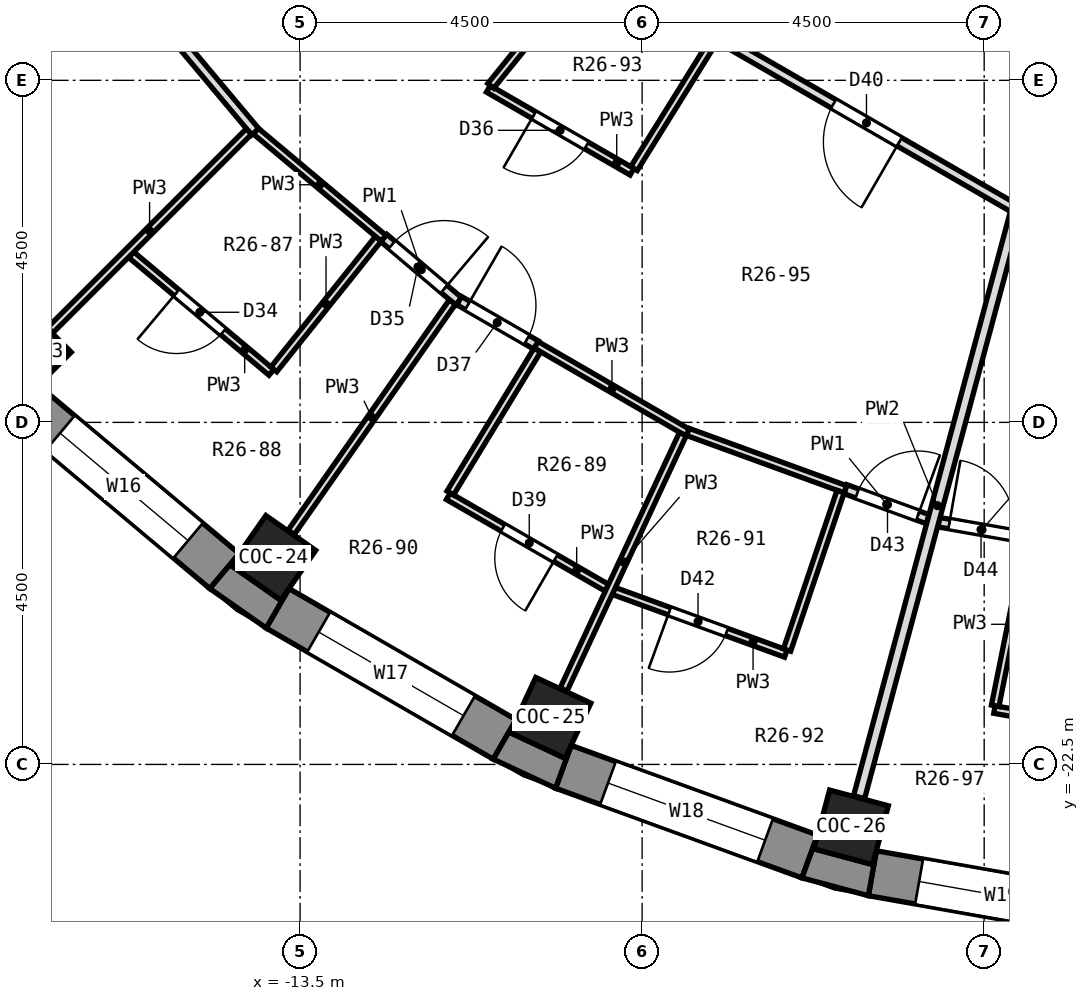
"""IFC4 building model, lengths in metres.
Left out: names, types, materials, properties, quantities, classifications, styles, units other than length and angle.
Written with IfcOpenShell. Run it as: python <this file> out.ifc"""

import sys

from ifc_helpers import new_model, si_unit, direction, frame, frame_2d, origin, origin_2d, place, context, subcontext, project, spatial, polyline, rectangle, outline, extrude, element, fill, save


model = new_model("IFC4")
c1 = context("Model", 3, precision=1e-05, world=origin(), true_north=direction((0.0, 1.0)))
c2 = subcontext(c1, "Body", "Model", "MODEL_VIEW")
j1 = project(units=[si_unit("LENGTHUNIT", "METRE"), si_unit("PLANEANGLEUNIT", "RADIAN")], contexts=[c1])
p1 = place(None, origin())
s1 = spatial("IfcSite", under=j1, at=p1, CompositionType="ELEMENT")
p2 = place(p1, origin())
s2 = spatial("IfcBuilding", under=s1, at=p2, CompositionType="ELEMENT")
p3 = place(p2, frame((0.0, 0.0, 170.7)))
s3 = spatial("IfcBuildingStorey", under=s2, at=p3, CompositionType="ELEMENT", Elevation=170.7)
for number, where, z_axis, x_axis in (
    (1, (-17.077, -17.077, 0.0), (0.0, 0.0, 1.0), (-0.707, -0.707, 0.0)),
    (2, (-13.852, -19.782, 0.0), (0.0, 0.0, 1.0), (-0.574, -0.819, 0.0)),
    (3, (-10.206, -21.887, 0.0), (0.0, 0.0, 1.0), (-0.423, -0.906, 0.0)),
    (4, (-6.25, -23.327, 0.0), (0.0, 0.0, 1.0), (-0.259, -0.966, 0.0)),
):
    element("IfcColumn", number, at=place(p3, frame(where, z_axis=z_axis, x_axis=x_axis)), inside=s3, PredefinedType="COLUMN", context=c2, shape_type="SweptSolid", body=[
        extrude(rectangle(XDim=0.8, YDim=0.8, at=origin_2d()), origin(), (0.0, 0.0, 1.0), 3.3),
    ])
p4 = place(p3, frame((-17.137, -17.74, 0.0), z_axis=(0.0, 0.0, 1.0), x_axis=(0.766058884809, -0.642770398358, 0.0)))
e5 = element("IfcWall", 5, at=p4, inside=s3, PredefinedType="SOLIDWALL", context=c2, shape_type="SweptSolid", body=[
    extrude(rectangle(XDim=3.449, YDim=0.6, at=frame_2d((1.725, 0.0))), origin(), (0.0, 0.0, 1.0), 2.85),
])
p5 = place(p4, frame((0.625, 0.0, 0.9)))
e6 = element("IfcOpeningElement", 6, at=p5, cuts=e5, PredefinedType="OPENING", context=c2, shape_type="SweptSolid", body=[
    extrude(rectangle(XDim=2.2, YDim=1.8, at=frame_2d((1.1, 0.9))), frame((0.0, 0.312, 0.0), z_axis=(0.0, -1.0, 0.0), x_axis=(1.0, 0.0, 0.0)), (0.0, 0.0, 1.0), 0.624),
])
p6 = place(p3, frame((-13.796, -20.446, 0.0), z_axis=(0.0, 0.0, 1.0), x_axis=(0.86602648383, -0.499998129301, 0.0)))
e7 = element("IfcWall", 7, at=p6, inside=s3, PredefinedType="SOLIDWALL", context=c2, shape_type="SweptSolid", body=[
    extrude(rectangle(XDim=3.45, YDim=0.6, at=frame_2d((1.725, 0.0))), origin(), (0.0, 0.0, 1.0), 2.85),
])
p7 = place(p6, frame((0.625, 0.0, 0.9)))
e8 = element("IfcOpeningElement", 8, at=p7, cuts=e7, PredefinedType="OPENING", context=c2, shape_type="SweptSolid", body=[
    extrude(rectangle(XDim=2.2, YDim=1.8, at=frame_2d((1.1, 0.9))), frame((0.0, 0.312, 0.0), z_axis=(0.0, -1.0, 0.0), x_axis=(1.0, 0.0, 0.0)), (0.0, 0.0, 1.0), 0.624),
])
p8 = place(p3, frame((-10.036, -22.531, 0.0), z_axis=(0.0, 0.0, 1.0), x_axis=(0.93968799822, -0.342032843455, 0.0)))
e9 = element("IfcWall", 9, at=p8, inside=s3, PredefinedType="SOLIDWALL", context=c2, shape_type="SweptSolid", body=[
    extrude(rectangle(XDim=3.45, YDim=0.6, at=frame_2d((1.725, 0.0))), origin(), (0.0, 0.0, 1.0), 2.85),
])
p9 = place(p8, frame((0.625, 0.0, 0.9)))
e10 = element("IfcOpeningElement", 10, at=p9, cuts=e9, PredefinedType="OPENING", context=c2, shape_type="SweptSolid", body=[
    extrude(rectangle(XDim=2.2, YDim=1.8, at=frame_2d((1.1, 0.9))), frame((0.0, 0.312, 0.0), z_axis=(0.0, -1.0, 0.0), x_axis=(1.0, 0.0, 0.0)), (0.0, 0.0, 1.0), 0.624),
])
p10 = place(p3, frame((-5.971, -23.932, 0.0), z_axis=(0.0, 0.0, 1.0), x_axis=(0.984814892183, -0.173607684551, 0.0)))
e11 = element("IfcWall", 11, at=p10, inside=s3, PredefinedType="SOLIDWALL", context=c2, shape_type="SweptSolid", body=[
    extrude(rectangle(XDim=3.45, YDim=0.6, at=frame_2d((1.725, 0.0))), origin(), (0.0, 0.0, 1.0), 2.85),
])
p11 = place(p10, frame((0.625, 0.0, 0.9)))
e12 = element("IfcOpeningElement", 12, at=p11, cuts=e11, PredefinedType="OPENING", context=c2, shape_type="SweptSolid", body=[
    extrude(rectangle(XDim=2.2, YDim=1.8, at=frame_2d((1.1, 0.9))), frame((0.0, 0.312, 0.0), z_axis=(0.0, -1.0, 0.0), x_axis=(1.0, 0.0, 0.0)), (0.0, 0.0, 1.0), 0.624),
])
p12 = place(p3, origin())
e13 = element("IfcWall", 13, at=p12, inside=s3, PredefinedType="SOLIDWALL", context=c2, shape_type="SweptSolid", body=[
    extrude(outline(polyline([(-14.687, -20.187), (-13.946, -20.706), (-13.646, -20.186), (-13.754, -20.34), (-14.409, -19.881), (-14.302, -19.727), (-14.687, -20.187)])), origin(), (0.0, 0.0, 1.0), 2.85),
])
p13 = place(p3, origin())
e14 = element("IfcWall", 14, at=p13, inside=s3, PredefinedType="SOLIDWALL", context=c2, shape_type="SweptSolid", body=[
    extrude(outline(polyline([(-10.139, -22.813), (-9.934, -22.249), (-10.013, -22.419), (-10.738, -22.081), (-10.659, -21.911), (-10.959, -22.431), (-10.139, -22.813)])), origin(), (0.0, 0.0, 1.0), 2.85),
])
p14 = place(p3, origin())
e15 = element("IfcWall", 15, at=p14, inside=s3, PredefinedType="SOLIDWALL", context=c2, shape_type="SweptSolid", body=[
    extrude(outline(polyline([(-6.023, -24.227), (-5.919, -23.636), (-5.968, -23.817), (-6.74, -23.61), (-6.692, -23.429), (-6.897, -23.993), (-6.023, -24.227)])), origin(), (0.0, 0.0, 1.0), 2.85),
])
p15 = place(p3, frame((-16.325, -11.511, 0.0), z_axis=(0.0, 0.0, 1.0), x_axis=(0.642416987395, -0.766355279428, 0.0)))
e16 = element("IfcWall", 16, at=p15, inside=s3, PredefinedType="PARTITIONING", context=c2, shape_type="SweptSolid", body=[
    extrude(rectangle(XDim=3.481, YDim=0.125, at=frame_2d((1.74, 0.0))), origin(), (0.0, 0.0, 1.0), 2.85),
])
p16 = place(p3, frame((-12.398, -15.574, 0.0), z_axis=(0.0, 0.0, 1.0), x_axis=(0.763379112729, -0.645950718128, 0.0)))
e17 = element("IfcWall", 17, at=p16, inside=s3, PredefinedType="PARTITIONING", context=c2, shape_type="SweptSolid", body=[
    extrude(rectangle(XDim=1.291, YDim=0.125, at=frame_2d((0.646, 0.0))), origin(), (0.0, 0.0, 1.0), 2.85),
])
p17 = place(p16, frame((0.139, 0.0, 0.0)))
e18 = element("IfcOpeningElement", 18, at=p17, cuts=e17, PredefinedType="OPENING", context=c2, shape_type="SweptSolid", body=[
    extrude(rectangle(XDim=0.9, YDim=2.1, at=frame_2d((0.45, 1.05))), frame((0.0, 0.074, 0.0), z_axis=(0.0, -1.0, 0.0), x_axis=(1.0, 0.0, 0.0)), (0.0, 0.0, 1.0), 0.149),
])
p18 = place(p3, frame((-15.723, -15.793, 0.0), z_axis=(0.0, 0.0, 1.0), x_axis=(0.766024146731, -0.642811797204, 0.0)))
e19 = element("IfcWall", 19, at=p18, inside=s3, PredefinedType="PARTITIONING", context=c2, shape_type="SweptSolid", body=[
    extrude(rectangle(XDim=2.409, YDim=0.1, at=frame_2d((1.205, 0.0))), origin(), (0.0, 0.0, 1.0), 2.85),
])
p19 = place(p18, frame((0.78, 0.0, 0.0)))
e20 = element("IfcOpeningElement", 20, at=p19, cuts=e19, PredefinedType="OPENING", context=c2, shape_type="SweptSolid", body=[
    extrude(rectangle(XDim=0.8, YDim=2.1, at=frame_2d((0.4, 1.05))), frame((0.0, 0.062, 0.0), z_axis=(0.0, -1.0, 0.0), x_axis=(1.0, 0.0, 0.0)), (0.0, 0.0, 1.0), 0.124),
])
p20 = place(p3, frame((-14.081, -14.169, 0.0), z_axis=(0.0, 0.0, 1.0), x_axis=(0.766108401036, -0.642711379907, 0.0)))
e21 = element("IfcWall", 21, at=p20, inside=s3, PredefinedType="PARTITIONING", context=c2, shape_type="SweptSolid", body=[
    extrude(rectangle(XDim=2.192, YDim=0.1, at=frame_2d((1.096, 0.0))), origin(), (0.0, 0.0, 1.0), 2.85),
])
p21 = place(p3, frame((-10.395, -16.979, 0.0), z_axis=(0.0, 0.0, 1.0), x_axis=(0.86526186487, -0.501320162373, 0.0)))
e22 = element("IfcWall", 22, at=p21, inside=s3, PredefinedType="PARTITIONING", context=c2, shape_type="SweptSolid", body=[
    extrude(rectangle(XDim=2.305, YDim=0.1, at=frame_2d((1.152, 0.0))), origin(), (0.0, 0.0, 1.0), 2.85),
])
p22 = place(p3, frame((-11.55, -18.972, 0.0), z_axis=(0.0, 0.0, 1.0), x_axis=(0.866140030745, -0.499801407703, 0.0)))
e23 = element("IfcWall", 23, at=p22, inside=s3, PredefinedType="PARTITIONING", context=c2, shape_type="SweptSolid", body=[
    extrude(rectangle(XDim=2.409, YDim=0.1, at=frame_2d((1.205, 0.0))), origin(), (0.0, 0.0, 1.0), 2.85),
])
p23 = place(p22, frame((0.83, 0.0, 0.0)))
e24 = element("IfcOpeningElement", 24, at=p23, cuts=e23, PredefinedType="OPENING", context=c2, shape_type="SweptSolid", body=[
    extrude(rectangle(XDim=0.8, YDim=2.1, at=frame_2d((0.4, 1.05))), frame((0.0, 0.062, 0.0), z_axis=(0.0, -1.0, 0.0), x_axis=(1.0, 0.0, 0.0)), (0.0, 0.0, 1.0), 0.124),
])
p24 = place(p3, frame((-11.407, -16.398, 0.0), z_axis=(0.0, 0.0, 1.0), x_axis=(0.865955664968, -0.500120771724, 0.0)))
e25 = element("IfcWall", 25, at=p24, inside=s3, PredefinedType="PARTITIONING", context=c2, shape_type="SweptSolid", body=[
    extrude(rectangle(XDim=1.167, YDim=0.125, at=frame_2d((0.583, 0.0))), origin(), (0.0, 0.0, 1.0), 2.85),
])
p25 = place(p24, frame((0.127, 0.0, 0.0)))
e26 = element("IfcOpeningElement", 26, at=p25, cuts=e25, PredefinedType="OPENING", context=c2, shape_type="SweptSolid", body=[
    extrude(rectangle(XDim=0.9, YDim=2.1, at=frame_2d((0.45, 1.05))), frame((0.0, 0.074, 0.0), z_axis=(0.0, -1.0, 0.0), x_axis=(1.0, 0.0, 0.0)), (0.0, 0.0, 1.0), 0.149),
])
p26 = place(p3, frame((-11.023, -13.612, 0.0), z_axis=(0.0, 0.0, 1.0), x_axis=(0.86608684879, -0.499893559023, 0.0)))
e27 = element("IfcWall", 27, at=p26, inside=s3, PredefinedType="PARTITIONING", context=c2, shape_type="SweptSolid", body=[
    extrude(rectangle(XDim=2.182, YDim=0.1, at=frame_2d((1.091, 0.0))), origin(), (0.0, 0.0, 1.0), 2.85),
])
p27 = place(p26, frame((0.691, 0.0, 0.0)))
e28 = element("IfcOpeningElement", 28, at=p27, cuts=e27, PredefinedType="OPENING", context=c2, shape_type="SweptSolid", body=[
    extrude(rectangle(XDim=0.8, YDim=2.1, at=frame_2d((0.4, 1.05))), frame((0.0, 0.062, 0.0), z_axis=(0.0, -1.0, 0.0), x_axis=(1.0, 0.0, 0.0)), (0.0, 0.0, 1.0), 0.124),
])
p28 = place(p3, frame((-11.073, -11.158, 0.0), z_axis=(0.0, 0.0, 1.0), x_axis=(0.865999621737, -0.500044653157, 0.0)))
e29 = element("IfcWall", 29, at=p28, inside=s3, PredefinedType="PARTITIONING", context=c2, shape_type="SweptSolid", body=[
    extrude(rectangle(XDim=8.155, YDim=0.125, at=frame_2d((4.078, 0.0))), origin(), (0.0, 0.0, 1.0), 2.85),
])
p29 = place(p28, frame((5.302, 0.0, 0.0)))
e30 = element("IfcOpeningElement", 30, at=p29, cuts=e29, PredefinedType="OPENING", context=c2, shape_type="SweptSolid", body=[
    extrude(rectangle(XDim=1.0, YDim=2.1, at=frame_2d((0.5, 1.05))), frame((0.0, 0.074, 0.0), z_axis=(0.0, -1.0, 0.0), x_axis=(1.0, 0.0, 0.0)), (0.0, 0.0, 1.0), 0.149),
])
p30 = place(p3, frame((-6.325, -18.879, 0.0), z_axis=(0.0, 0.0, 1.0), x_axis=(0.93942221686, -0.342762160206, 0.0)))
e31 = element("IfcWall", 31, at=p30, inside=s3, PredefinedType="PARTITIONING", context=c2, shape_type="SweptSolid", body=[
    extrude(rectangle(XDim=1.154, YDim=0.125, at=frame_2d((0.577, 0.0))), origin(), (0.0, 0.0, 1.0), 2.85),
])
p31 = place(p30, frame((0.165, 0.0, 0.0)))
e32 = element("IfcOpeningElement", 32, at=p31, cuts=e31, PredefinedType="OPENING", context=c2, shape_type="SweptSolid", body=[
    extrude(rectangle(XDim=0.85, YDim=2.1, at=frame_2d((0.425, 1.05))), frame((0.0, 0.074, 0.0), z_axis=(0.0, -1.0, 0.0), x_axis=(1.0, 0.0, 0.0)), (0.0, 0.0, 1.0), 0.149),
])
p32 = place(p3, frame((-9.373, -20.218, 0.0), z_axis=(0.0, 0.0, 1.0), x_axis=(0.939707598657, -0.34197898916, 0.0)))
e33 = element("IfcWall", 33, at=p32, inside=s3, PredefinedType="PARTITIONING", context=c2, shape_type="SweptSolid", body=[
    extrude(rectangle(XDim=2.409, YDim=0.1, at=frame_2d((1.205, 0.0))), origin(), (0.0, 0.0, 1.0), 2.85),
])
p33 = place(p32, frame((0.78, 0.0, 0.0)))
e34 = element("IfcOpeningElement", 34, at=p33, cuts=e33, PredefinedType="OPENING", context=c2, shape_type="SweptSolid", body=[
    extrude(rectangle(XDim=0.8, YDim=2.1, at=frame_2d((0.4, 1.05))), frame((0.0, 0.062, 0.0), z_axis=(0.0, -1.0, 0.0), x_axis=(1.0, 0.0, 0.0)), (0.0, 0.0, 1.0), 0.124),
])
p34 = place(p3, frame((-8.397, -18.126, 0.0), z_axis=(0.0, 0.0, 1.0), x_axis=(0.939676937302, -0.342063230271, 0.0)))
e35 = element("IfcWall", 35, at=p34, inside=s3, PredefinedType="PARTITIONING", context=c2, shape_type="SweptSolid", body=[
    extrude(rectangle(XDim=2.204, YDim=0.1, at=frame_2d((1.102, 0.0))), origin(), (0.0, 0.0, 1.0), 2.85),
])
p35 = place(p3, frame((-4.365, -21.778, 0.0), z_axis=(0.0, 0.0, 1.0), x_axis=(0.984820260231, -0.173577230762, 0.0)))
e36 = element("IfcWall", 36, at=p35, inside=s3, PredefinedType="PARTITIONING", context=c2, shape_type="SweptSolid", body=[
    extrude(rectangle(XDim=2.409, YDim=0.1, at=frame_2d((1.205, 0.0))), origin(), (0.0, 0.0, 1.0), 2.85),
])
p36 = place(p35, frame((0.83, 0.0, 0.0)))
e37 = element("IfcOpeningElement", 37, at=p36, cuts=e36, PredefinedType="OPENING", context=c2, shape_type="SweptSolid", body=[
    extrude(rectangle(XDim=0.8, YDim=2.1, at=frame_2d((0.4, 1.05))), frame((0.0, 0.062, 0.0), z_axis=(0.0, -1.0, 0.0), x_axis=(1.0, 0.0, 0.0)), (0.0, 0.0, 1.0), 0.124),
])
p37 = place(p3, frame((-5.097, -19.313, 0.0), z_axis=(0.0, 0.0, 1.0), x_axis=(0.984787819846, -0.173761186352, 0.0)))
e38 = element("IfcWall", 38, at=p37, inside=s3, PredefinedType="PARTITIONING", context=c2, shape_type="SweptSolid", body=[
    extrude(rectangle(XDim=1.154, YDim=0.125, at=frame_2d((0.577, 0.0))), origin(), (0.0, 0.0, 1.0), 2.85),
])
p38 = place(p37, frame((0.139, 0.0, 0.0)))
e39 = element("IfcOpeningElement", 39, at=p38, cuts=e38, PredefinedType="OPENING", context=c2, shape_type="SweptSolid", body=[
    extrude(rectangle(XDim=0.85, YDim=2.1, at=frame_2d((0.425, 1.05))), frame((0.0, 0.074, 0.0), z_axis=(0.0, -1.0, 0.0), x_axis=(1.0, 0.0, 0.0)), (0.0, 0.0, 1.0), 0.149),
])
p39 = place(p3, frame((-16.787, -16.787, 0.0), z_axis=(0.0, 0.0, 1.0), x_axis=(0.707106781187, 0.707106781187, 0.0)))
e40 = element("IfcWall", 40, at=p39, inside=s3, PredefinedType="PARTITIONING", context=c2, shape_type="SweptSolid", body=[
    extrude(rectangle(XDim=3.696, YDim=0.1, at=frame_2d((1.848, 0.0))), origin(), (0.0, 0.0, 1.0), 2.85),
])
p40 = place(p3, frame((-10.991, -13.573, 0.0), z_axis=(0.0, 0.0, 1.0), x_axis=(0.629327284659, 0.777140379072, 0.0)))
e41 = element("IfcWall", 41, at=p40, inside=s3, PredefinedType="PARTITIONING", context=c2, shape_type="SweptSolid", body=[
    extrude(rectangle(XDim=2.013, YDim=0.1, at=frame_2d((1.007, 0.0))), origin(), (0.0, 0.0, 1.0), 2.85),
])
p41 = place(p3, frame((-13.846, -17.303, 0.0), z_axis=(0.0, 0.0, 1.0), x_axis=(0.624722111344, 0.780847157642, 0.0)))
e42 = element("IfcWall", 42, at=p41, inside=s3, PredefinedType="PARTITIONING", context=c2, shape_type="SweptSolid", body=[
    extrude(rectangle(XDim=2.2, YDim=0.1, at=frame_2d((1.1, 0.0))), origin(), (0.0, 0.0, 1.0), 2.85),
])
p42 = place(p3, frame((-13.617, -19.447, 0.0), z_axis=(0.0, 0.0, 1.0), x_axis=(0.573515531974, 0.819194686619, 0.0)))
e43 = element("IfcWall", 43, at=p42, inside=s3, PredefinedType="PARTITIONING", context=c2, shape_type="SweptSolid", body=[
    extrude(rectangle(XDim=3.697, YDim=0.1, at=frame_2d((1.848, 0.0))), origin(), (0.0, 0.0, 1.0), 2.85),
])
p43 = place(p3, frame((-9.107, -14.661, 0.0), z_axis=(0.0, 0.0, 1.0), x_axis=(0.528010719156, 0.849237705508, 0.0)))
e44 = element("IfcWall", 44, at=p43, inside=s3, PredefinedType="PARTITIONING", context=c2, shape_type="SweptSolid", body=[
    extrude(rectangle(XDim=1.988, YDim=0.1, at=frame_2d((0.994, 0.0))), origin(), (0.0, 0.0, 1.0), 2.85),
])
p44 = place(p3, frame((-11.524, -18.929, 0.0), z_axis=(0.0, 0.0, 1.0), x_axis=(0.520291802012, 0.853988548377, 0.0)))
e45 = element("IfcWall", 45, at=p44, inside=s3, PredefinedType="PARTITIONING", context=c2, shape_type="SweptSolid", body=[
    extrude(rectangle(XDim=2.201, YDim=0.1, at=frame_2d((1.1, 0.0))), origin(), (0.0, 0.0, 1.0), 2.85),
])
p45 = place(p3, frame((-10.034, -21.515, 0.0), z_axis=(0.0, 0.0, 1.0), x_axis=(0.423040405982, 0.906110818226, 0.0)))
e46 = element("IfcWall", 46, at=p45, inside=s3, PredefinedType="PARTITIONING", context=c2, shape_type="SweptSolid", body=[
    extrude(rectangle(XDim=3.709, YDim=0.1, at=frame_2d((1.854, 0.0))), origin(), (0.0, 0.0, 1.0), 2.85),
])
p46 = place(p3, frame((-7.093, -20.995, 0.0), z_axis=(0.0, 0.0, 1.0), x_axis=(0.320053851591, 0.947399351953, 0.0)))
e47 = element("IfcWall", 47, at=p46, inside=s3, PredefinedType="PARTITIONING", context=c2, shape_type="SweptSolid", body=[
    extrude(rectangle(XDim=2.2, YDim=0.1, at=frame_2d((1.1, 0.0))), origin(), (0.0, 0.0, 1.0), 2.85),
])
p47 = place(p3, frame((-6.146, -22.931, 0.0), z_axis=(0.0, 0.0, 1.0), x_axis=(0.259231390727, 0.965815244269, 0.0)))
e48 = element("IfcWall", 48, at=p47, inside=s3, PredefinedType="PARTITIONING", context=c2, shape_type="SweptSolid", body=[
    extrude(rectangle(XDim=7.941, YDim=0.15, at=frame_2d((3.971, 0.0))), origin(), (0.0, 0.0, 1.0), 2.85),
])
p48 = place(p3, frame((-4.355, -21.729, 0.0), z_axis=(0.0, 0.0, 1.0), x_axis=(0.196888353759, 0.980425915689, 0.0)))
e49 = element("IfcWall", 49, at=p48, inside=s3, PredefinedType="PARTITIONING", context=c2, shape_type="SweptSolid", body=[
    extrude(rectangle(XDim=2.188, YDim=0.1, at=frame_2d((1.094, 0.0))), origin(), (0.0, 0.0, 1.0), 2.85),
])
p49 = place(p5, origin())
e50 = element("IfcWindow", 50, at=p49, inside=s3, PartitioningType="SINGLE_PANEL", PredefinedType="WINDOW", context=c2, shape_type="SweptSolid", body=[
    extrude(rectangle(XDim=2.2, YDim=1.8, at=frame_2d((1.1, 0.9))), frame((0.0, 0.18, 0.0), z_axis=(0.0, -1.0, 0.0), x_axis=(1.0, 0.0, 0.0)), (0.0, 0.0, 1.0), 0.06),
])
fill(e6, e50)
p50 = place(p7, origin())
e51 = element("IfcWindow", 51, at=p50, inside=s3, PartitioningType="SINGLE_PANEL", PredefinedType="WINDOW", context=c2, shape_type="SweptSolid", body=[
    extrude(rectangle(XDim=2.2, YDim=1.8, at=frame_2d((1.1, 0.9))), frame((0.0, 0.18, 0.0), z_axis=(0.0, -1.0, 0.0), x_axis=(1.0, 0.0, 0.0)), (0.0, 0.0, 1.0), 0.06),
])
fill(e8, e51)
p51 = place(p9, origin())
e52 = element("IfcWindow", 52, at=p51, inside=s3, PartitioningType="SINGLE_PANEL", PredefinedType="WINDOW", context=c2, shape_type="SweptSolid", body=[
    extrude(rectangle(XDim=2.2, YDim=1.8, at=frame_2d((1.1, 0.9))), frame((0.0, 0.18, 0.0), z_axis=(0.0, -1.0, 0.0), x_axis=(1.0, 0.0, 0.0)), (0.0, 0.0, 1.0), 0.06),
])
fill(e10, e52)
p52 = place(p11, origin())
e53 = element("IfcWindow", 53, at=p52, inside=s3, PartitioningType="SINGLE_PANEL", PredefinedType="WINDOW", context=c2, shape_type="SweptSolid", body=[
    extrude(rectangle(XDim=2.2, YDim=1.8, at=frame_2d((1.1, 0.9))), frame((0.0, 0.18, 0.0), z_axis=(0.0, -1.0, 0.0), x_axis=(1.0, 0.0, 0.0)), (0.0, 0.0, 1.0), 0.06),
])
fill(e12, e53)
p53 = place(p19, frame((0.8, 0.0, 0.0), z_axis=(0.0, 0.0, 1.0), x_axis=(-1.0, 0.0, 0.0)))
e54 = element("IfcDoor", 54, at=p53, inside=s3, OperationType="SINGLE_SWING_RIGHT", PredefinedType="DOOR", context=c2, shape_type="SweptSolid", body=[
    extrude(rectangle(XDim=0.8, YDim=2.1, at=frame_2d((0.4, 1.05))), frame((0.0, 0.025, 0.0), z_axis=(0.0, -1.0, 0.0), x_axis=(1.0, 0.0, 0.0)), (0.0, 0.0, 1.0), 0.05),
])
fill(e20, e54)
p54 = place(p17, origin())
e55 = element("IfcDoor", 55, at=p54, inside=s3, OperationType="SINGLE_SWING_RIGHT", PredefinedType="DOOR", context=c2, shape_type="SweptSolid", body=[
    extrude(rectangle(XDim=0.9, YDim=2.1, at=frame_2d((0.45, 1.05))), frame((0.0, 0.025, 0.0), z_axis=(0.0, -1.0, 0.0), x_axis=(1.0, 0.0, 0.0)), (0.0, 0.0, 1.0), 0.05),
])
fill(e18, e55)
p55 = place(p27, frame((0.8, 0.0, 0.0), z_axis=(0.0, 0.0, 1.0), x_axis=(-1.0, 0.0, 0.0)))
e56 = element("IfcDoor", 56, at=p55, inside=s3, OperationType="SINGLE_SWING_RIGHT", PredefinedType="DOOR", context=c2, shape_type="SweptSolid", body=[
    extrude(rectangle(XDim=0.8, YDim=2.1, at=frame_2d((0.4, 1.05))), frame((0.0, 0.025, 0.0), z_axis=(0.0, -1.0, 0.0), x_axis=(1.0, 0.0, 0.0)), (0.0, 0.0, 1.0), 0.05),
])
fill(e28, e56)
p56 = place(p25, origin())
e57 = element("IfcDoor", 57, at=p56, inside=s3, OperationType="SINGLE_SWING_LEFT", PredefinedType="DOOR", context=c2, shape_type="SweptSolid", body=[
    extrude(rectangle(XDim=0.9, YDim=2.1, at=frame_2d((0.45, 1.05))), frame((0.0, 0.025, 0.0), z_axis=(0.0, -1.0, 0.0), x_axis=(1.0, 0.0, 0.0)), (0.0, 0.0, 1.0), 0.05),
])
fill(e26, e57)
p57 = place(p23, frame((0.8, 0.0, 0.0), z_axis=(0.0, 0.0, 1.0), x_axis=(-1.0, 0.0, 0.0)))
e58 = element("IfcDoor", 58, at=p57, inside=s3, OperationType="SINGLE_SWING_LEFT", PredefinedType="DOOR", context=c2, shape_type="SweptSolid", body=[
    extrude(rectangle(XDim=0.8, YDim=2.1, at=frame_2d((0.4, 1.05))), frame((0.0, 0.025, 0.0), z_axis=(0.0, -1.0, 0.0), x_axis=(1.0, 0.0, 0.0)), (0.0, 0.0, 1.0), 0.05),
])
fill(e24, e58)
p58 = place(p29, frame((1.0, 0.0, 0.0), z_axis=(0.0, 0.0, 1.0), x_axis=(-1.0, 0.0, 0.0)))
e59 = element("IfcDoor", 59, at=p58, inside=s3, OperationType="SINGLE_SWING_LEFT", PredefinedType="DOOR", context=c2, shape_type="SweptSolid", body=[
    extrude(rectangle(XDim=1.0, YDim=2.1, at=frame_2d((0.5, 1.05))), frame((0.0, 0.025, 0.0), z_axis=(0.0, -1.0, 0.0), x_axis=(1.0, 0.0, 0.0)), (0.0, 0.0, 1.0), 0.05),
])
fill(e30, e59)
p59 = place(p33, frame((0.8, 0.0, 0.0), z_axis=(0.0, 0.0, 1.0), x_axis=(-1.0, 0.0, 0.0)))
e60 = element("IfcDoor", 60, at=p59, inside=s3, OperationType="SINGLE_SWING_RIGHT", PredefinedType="DOOR", context=c2, shape_type="SweptSolid", body=[
    extrude(rectangle(XDim=0.8, YDim=2.1, at=frame_2d((0.4, 1.05))), frame((0.0, 0.025, 0.0), z_axis=(0.0, -1.0, 0.0), x_axis=(1.0, 0.0, 0.0)), (0.0, 0.0, 1.0), 0.05),
])
fill(e34, e60)
p60 = place(p31, origin())
e61 = element("IfcDoor", 61, at=p60, inside=s3, OperationType="SINGLE_SWING_RIGHT", PredefinedType="DOOR", context=c2, shape_type="SweptSolid", body=[
    extrude(rectangle(XDim=0.85, YDim=2.1, at=frame_2d((0.425, 1.05))), frame((0.0, 0.025, 0.0), z_axis=(0.0, -1.0, 0.0), x_axis=(1.0, 0.0, 0.0)), (0.0, 0.0, 1.0), 0.05),
])
fill(e32, e61)
p61 = place(p38, origin())
e62 = element("IfcDoor", 62, at=p61, inside=s3, OperationType="SINGLE_SWING_LEFT", PredefinedType="DOOR", context=c2, shape_type="SweptSolid", body=[
    extrude(rectangle(XDim=0.85, YDim=2.1, at=frame_2d((0.425, 1.05))), frame((0.0, 0.025, 0.0), z_axis=(0.0, -1.0, 0.0), x_axis=(1.0, 0.0, 0.0)), (0.0, 0.0, 1.0), 0.05),
])
fill(e39, e62)
save(model, sys.argv[1])
